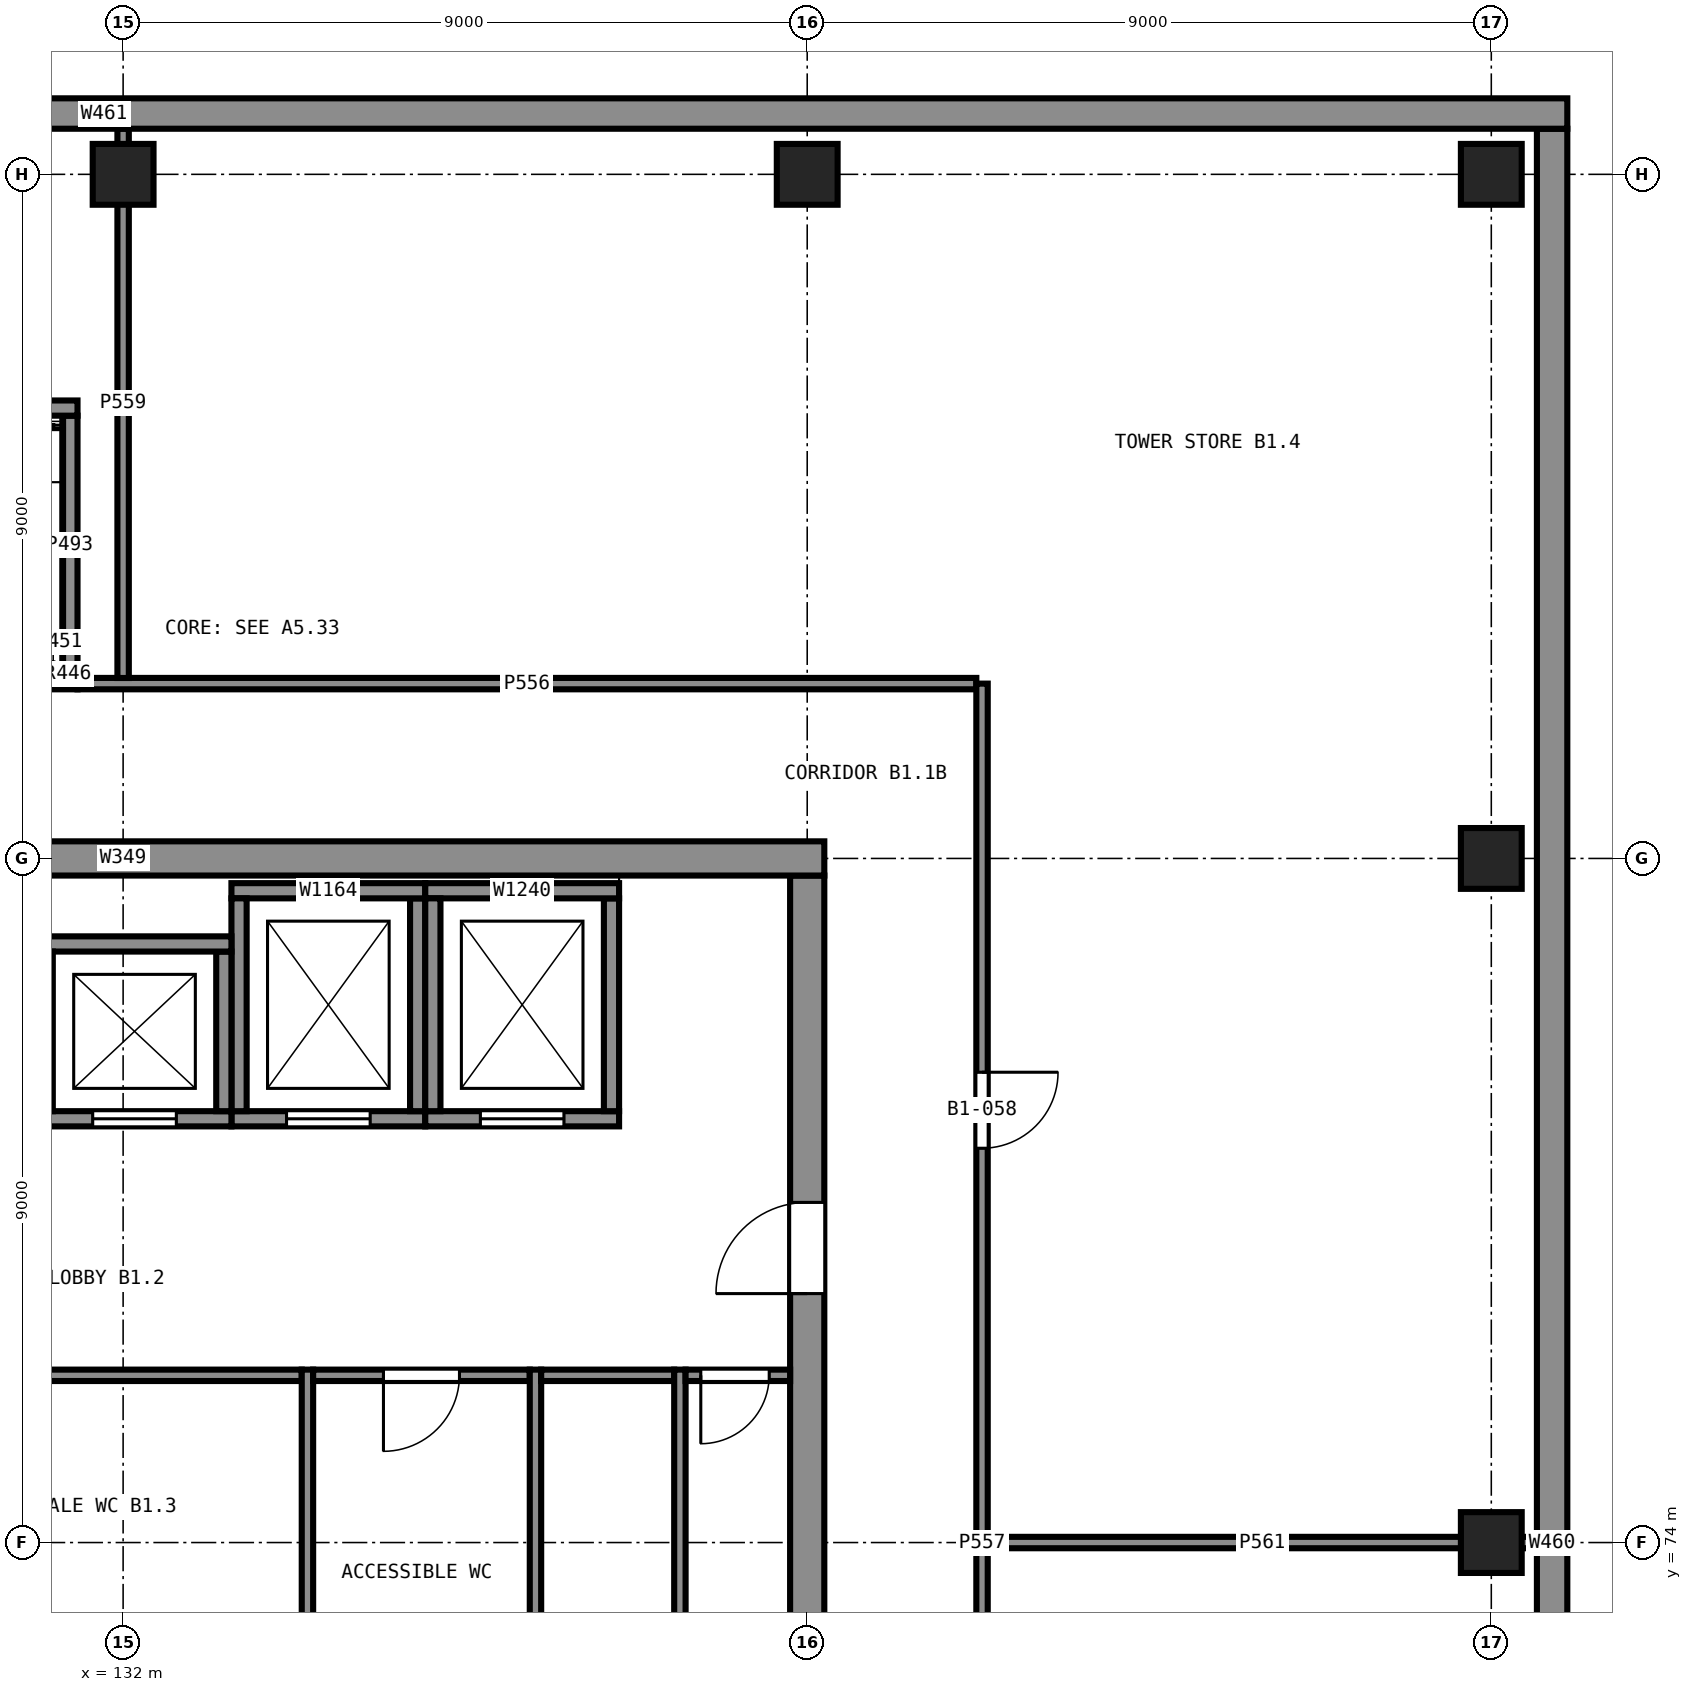
"""IFC4 building model, lengths in metres.
Left out: names, types, materials, properties, quantities, classifications, styles, units other than length and angle.
Written with IfcOpenShell. Run it as: python <this file> out.ifc"""

import sys

from ifc_helpers import new_model, si_unit, direction, frame, frame_2d, origin, origin_2d, place, context, subcontext, project, spatial, rectangle, extrude, element, fill, save


model = new_model("IFC4")
c1 = context("Model", 3, precision=1e-05, world=origin(), true_north=direction((0.0, 1.0)))
c2 = subcontext(c1, "Body", "Model", "MODEL_VIEW")
j1 = project(units=[si_unit("LENGTHUNIT", "METRE"), si_unit("PLANEANGLEUNIT", "RADIAN")], contexts=[c1])
p1 = place(None, origin())
s1 = spatial("IfcSite", under=j1, at=p1, CompositionType="ELEMENT")
p2 = place(p1, origin())
s2 = spatial("IfcBuilding", under=s1, at=p2, CompositionType="ELEMENT")
p3 = place(p2, frame((0.0, 0.0, -5.0)))
s3 = spatial("IfcBuildingStorey", under=s2, at=p3, CompositionType="ELEMENT", Elevation=-5.0)
for number, where, z_axis, x_axis in (
    (1, (132.0, 92.0, 0.0), (0.0, 0.0, 1.0), (1.0, 0.0, 0.0)),
    (2, (141.0, 92.0, 0.0), (0.0, 0.0, 1.0), (1.0, 0.0, 0.0)),
    (3, (150.0, 74.0, 0.0), (0.0, 0.0, 1.0), (1.0, 0.0, 0.0)),
    (4, (150.0, 83.0, 0.0), (0.0, 0.0, 1.0), (1.0, 0.0, 0.0)),
    (5, (150.0, 92.0, 0.0), (0.0, 0.0, 1.0), (1.0, 0.0, 0.0)),
):
    element("IfcColumn", number, at=place(p3, frame(where, z_axis=z_axis, x_axis=x_axis)), inside=s3, PredefinedType="COLUMN", context=c2, shape_type="SweptSolid", body=[
        extrude(rectangle(XDim=0.8, YDim=0.8, at=origin_2d()), origin(), (0.0, 0.0, 1.0), 5.0),
    ])
p4 = place(p3, frame((141.0, 65.225, 0.0), z_axis=(0.0, 0.0, 1.0), x_axis=(0.0, 1.0, 0.0)))
e6 = element("IfcWall", 6, at=p4, inside=s3, PredefinedType="SHEAR", context=c2, shape_type="SweptSolid", body=[
    extrude(rectangle(XDim=17.55, YDim=0.45, at=frame_2d((8.775, 0.0))), origin(), (0.0, 0.0, 1.0), 5.0),
])
p5 = place(p4, frame((4.3, 0.0, 0.0)))
e7 = element("IfcOpeningElement", 7, at=p5, cuts=e6, PredefinedType="OPENING", context=c2, shape_type="SweptSolid", body=[
    extrude(rectangle(XDim=1.2, YDim=2.1, at=frame_2d((0.6, 1.05))), frame((0.0, 0.235, 0.0), z_axis=(0.0, -1.0, 0.0), x_axis=(1.0, 0.0, 0.0)), (0.0, 0.0, 1.0), 0.47),
])
p6 = place(p4, frame((12.05, 0.0, 0.0)))
e8 = element("IfcOpeningElement", 8, at=p6, cuts=e6, PredefinedType="OPENING", context=c2, shape_type="SweptSolid", body=[
    extrude(rectangle(XDim=1.2, YDim=2.1, at=frame_2d((0.6, 1.05))), frame((0.0, 0.235, 0.0), z_axis=(0.0, -1.0, 0.0), x_axis=(1.0, 0.0, 0.0)), (0.0, 0.0, 1.0), 0.47),
])
p7 = place(p3, frame((141.225, 83.0, 0.0), z_axis=(0.0, 0.0, 1.0), x_axis=(-1.0, 0.0, 0.0)))
e9 = element("IfcWall", 9, at=p7, inside=s3, PredefinedType="SHEAR", context=c2, shape_type="SweptSolid", body=[
    extrude(rectangle(XDim=18.45, YDim=0.45, at=frame_2d((9.225, 0.0))), origin(), (0.0, 0.0, 1.0), 5.0),
])
p8 = place(p3, frame((150.8, 55.4, 0.0), z_axis=(0.0, 0.0, 1.0), x_axis=(0.0, 1.0, 0.0)))
e10 = element("IfcWall", 10, at=p8, inside=s3, PredefinedType="SOLIDWALL", context=c2, shape_type="SweptSolid", body=[
    extrude(rectangle(XDim=37.2, YDim=0.4, at=frame_2d((18.6, 0.0))), origin(), (0.0, 0.0, 1.0), 4.58),
])
p9 = place(p3, frame((151.0, 92.8, 0.0), z_axis=(0.0, 0.0, 1.0), x_axis=(-1.0, 0.0, 0.0)))
e11 = element("IfcWall", 11, at=p9, inside=s3, PredefinedType="SOLIDWALL", context=c2, shape_type="SweptSolid", body=[
    extrude(rectangle(XDim=38.5, YDim=0.4, at=frame_2d((19.25, 0.0))), origin(), (0.0, 0.0, 1.0), 4.58),
])
p10 = place(p3, frame((130.875, 79.575, 0.0), z_axis=(0.0, 0.0, 1.0), x_axis=(1.0, 0.0, 0.0)))
e12 = element("IfcWall", 12, at=p10, inside=s3, PredefinedType="SHEAR", context=c2, shape_type="SweptSolid", body=[
    extrude(rectangle(XDim=2.55, YDim=0.2, at=frame_2d((1.275, 0.0))), origin(), (0.0, 0.0, 1.0), 5.0),
])
p11 = place(p10, frame((0.725, 0.0, 0.0)))
e13 = element("IfcOpeningElement", 13, at=p11, cuts=e12, PredefinedType="OPENING", context=c2, shape_type="SweptSolid", body=[
    extrude(rectangle(XDim=1.1, YDim=2.1, at=frame_2d((0.55, 1.05))), frame((0.0, 0.11, 0.0), z_axis=(0.0, -1.0, 0.0), x_axis=(1.0, 0.0, 0.0)), (0.0, 0.0, 1.0), 0.22),
])
p12 = place(p3, frame((133.325, 79.675, 0.0), z_axis=(0.0, 0.0, 1.0), x_axis=(0.0, 1.0, 0.0)))
e14 = element("IfcWall", 14, at=p12, inside=s3, PredefinedType="SHEAR", context=c2, shape_type="SweptSolid", body=[
    extrude(rectangle(XDim=2.1, YDim=0.2, at=frame_2d((1.05, 0.0))), origin(), (0.0, 0.0, 1.0), 5.0),
])
p13 = place(p3, frame((133.425, 81.875, 0.0), z_axis=(0.0, 0.0, 1.0), x_axis=(-1.0, 0.0, 0.0)))
e15 = element("IfcWall", 15, at=p13, inside=s3, PredefinedType="SHEAR", context=c2, shape_type="SweptSolid", body=[
    extrude(rectangle(XDim=2.55, YDim=0.2, at=frame_2d((1.275, 0.0))), origin(), (0.0, 0.0, 1.0), 5.0),
])
p14 = place(p3, frame((130.975, 81.775, 0.0), z_axis=(0.0, 0.0, 1.0), x_axis=(0.0, -1.0, 0.0)))
e16 = element("IfcWall", 16, at=p14, inside=s3, PredefinedType="SHEAR", context=c2, shape_type="SweptSolid", body=[
    extrude(rectangle(XDim=2.1, YDim=0.2, at=frame_2d((1.05, 0.0))), origin(), (0.0, 0.0, 1.0), 5.0),
])
p15 = place(p3, frame((133.425, 79.575, 0.0), z_axis=(0.0, 0.0, 1.0), x_axis=(1.0, 0.0, 0.0)))
e17 = element("IfcWall", 17, at=p15, inside=s3, PredefinedType="SHEAR", context=c2, shape_type="SweptSolid", body=[
    extrude(rectangle(XDim=2.55, YDim=0.2, at=frame_2d((1.275, 0.0))), origin(), (0.0, 0.0, 1.0), 5.0),
])
p16 = place(p15, frame((0.725, 0.0, 0.0)))
e18 = element("IfcOpeningElement", 18, at=p16, cuts=e17, PredefinedType="OPENING", context=c2, shape_type="SweptSolid", body=[
    extrude(rectangle(XDim=1.1, YDim=2.1, at=frame_2d((0.55, 1.05))), frame((0.0, 0.11, 0.0), z_axis=(0.0, -1.0, 0.0), x_axis=(1.0, 0.0, 0.0)), (0.0, 0.0, 1.0), 0.22),
])
p17 = place(p3, frame((135.875, 79.675, 0.0), z_axis=(0.0, 0.0, 1.0), x_axis=(0.0, 1.0, 0.0)))
e19 = element("IfcWall", 19, at=p17, inside=s3, PredefinedType="SHEAR", context=c2, shape_type="SweptSolid", body=[
    extrude(rectangle(XDim=2.8, YDim=0.2, at=frame_2d((1.4, 0.0))), origin(), (0.0, 0.0, 1.0), 5.0),
])
p18 = place(p3, frame((135.975, 82.575, 0.0), z_axis=(0.0, 0.0, 1.0), x_axis=(-1.0, 0.0, 0.0)))
e20 = element("IfcWall", 20, at=p18, inside=s3, PredefinedType="SHEAR", context=c2, shape_type="SweptSolid", body=[
    extrude(rectangle(XDim=2.55, YDim=0.2, at=frame_2d((1.275, 0.0))), origin(), (0.0, 0.0, 1.0), 5.0),
])
p19 = place(p3, frame((133.525, 82.475, 0.0), z_axis=(0.0, 0.0, 1.0), x_axis=(0.0, -1.0, 0.0)))
e21 = element("IfcWall", 21, at=p19, inside=s3, PredefinedType="SHEAR", context=c2, shape_type="SweptSolid", body=[
    extrude(rectangle(XDim=2.8, YDim=0.2, at=frame_2d((1.4, 0.0))), origin(), (0.0, 0.0, 1.0), 5.0),
])
p20 = place(p3, frame((135.975, 79.575, 0.0), z_axis=(0.0, 0.0, 1.0), x_axis=(1.0, 0.0, 0.0)))
e22 = element("IfcWall", 22, at=p20, inside=s3, PredefinedType="SHEAR", context=c2, shape_type="SweptSolid", body=[
    extrude(rectangle(XDim=2.55, YDim=0.2, at=frame_2d((1.275, 0.0))), origin(), (0.0, 0.0, 1.0), 5.0),
])
p21 = place(p20, frame((0.725, 0.0, 0.0)))
e23 = element("IfcOpeningElement", 23, at=p21, cuts=e22, PredefinedType="OPENING", context=c2, shape_type="SweptSolid", body=[
    extrude(rectangle(XDim=1.1, YDim=2.1, at=frame_2d((0.55, 1.05))), frame((0.0, 0.11, 0.0), z_axis=(0.0, -1.0, 0.0), x_axis=(1.0, 0.0, 0.0)), (0.0, 0.0, 1.0), 0.22),
])
p22 = place(p3, frame((138.425, 79.675, 0.0), z_axis=(0.0, 0.0, 1.0), x_axis=(0.0, 1.0, 0.0)))
e24 = element("IfcWall", 24, at=p22, inside=s3, PredefinedType="SHEAR", context=c2, shape_type="SweptSolid", body=[
    extrude(rectangle(XDim=2.8, YDim=0.2, at=frame_2d((1.4, 0.0))), origin(), (0.0, 0.0, 1.0), 5.0),
])
p23 = place(p3, frame((138.525, 82.575, 0.0), z_axis=(0.0, 0.0, 1.0), x_axis=(-1.0, 0.0, 0.0)))
e25 = element("IfcWall", 25, at=p23, inside=s3, PredefinedType="SHEAR", context=c2, shape_type="SweptSolid", body=[
    extrude(rectangle(XDim=2.55, YDim=0.2, at=frame_2d((1.275, 0.0))), origin(), (0.0, 0.0, 1.0), 5.0),
])
p24 = place(p3, frame((136.075, 82.475, 0.0), z_axis=(0.0, 0.0, 1.0), x_axis=(0.0, -1.0, 0.0)))
e26 = element("IfcWall", 26, at=p24, inside=s3, PredefinedType="SHEAR", context=c2, shape_type="SweptSolid", body=[
    extrude(rectangle(XDim=2.8, YDim=0.2, at=frame_2d((1.4, 0.0))), origin(), (0.0, 0.0, 1.0), 5.0),
])
p25 = place(p3, frame((123.6, 85.325, 0.0), z_axis=(0.0, 0.0, 1.0), x_axis=(1.0, 0.0, 0.0)))
e27 = element("IfcWall", 27, at=p25, inside=s3, PredefinedType="SHEAR", context=c2, shape_type="SweptSolid", body=[
    extrude(rectangle(XDim=7.8, YDim=0.2, at=frame_2d((3.9, 0.0))), origin(), (0.0, 0.0, 1.0), 4.58),
])
p26 = place(p25, frame((0.6, 0.0, 0.0)))
e28 = element("IfcOpeningElement", 28, at=p26, cuts=e27, PredefinedType="OPENING", context=c2, shape_type="SweptSolid", body=[
    extrude(rectangle(XDim=1.0, YDim=2.1, at=frame_2d((0.5, 1.05))), frame((0.0, 0.11, 0.0), z_axis=(0.0, -1.0, 0.0), x_axis=(1.0, 0.0, 0.0)), (0.0, 0.0, 1.0), 0.22),
])
p27 = place(p3, frame((131.3, 85.425, 0.0), z_axis=(0.0, 0.0, 1.0), x_axis=(0.0, 1.0, 0.0)))
e29 = element("IfcWall", 29, at=p27, inside=s3, PredefinedType="SHEAR", context=c2, shape_type="SweptSolid", body=[
    extrude(rectangle(XDim=3.4, YDim=0.2, at=frame_2d((1.7, 0.0))), origin(), (0.0, 0.0, 1.0), 4.58),
])
p28 = place(p3, frame((131.4, 88.925, 0.0), z_axis=(0.0, 0.0, 1.0), x_axis=(-1.0, 0.0, 0.0)))
e30 = element("IfcWall", 30, at=p28, inside=s3, PredefinedType="SHEAR", context=c2, shape_type="SweptSolid", body=[
    extrude(rectangle(XDim=7.8, YDim=0.2, at=frame_2d((3.9, 0.0))), origin(), (0.0, 0.0, 1.0), 4.58),
])
p29 = place(p3, frame((134.425, 71.725, 0.0), z_axis=(0.0, 0.0, 1.0), x_axis=(0.0, 1.0, 0.0)))
e31 = element("IfcWall", 31, at=p29, inside=s3, PredefinedType="PARTITIONING", context=c2, shape_type="SweptSolid", body=[
    extrude(rectangle(XDim=4.55, YDim=0.15, at=frame_2d((2.275, 0.0))), origin(), (0.0, 0.0, 1.0), 4.58),
])
p30 = place(p3, frame((130.3, 76.2, 0.0), z_axis=(0.0, 0.0, 1.0), x_axis=(1.0, 0.0, 0.0)))
e32 = element("IfcWall", 32, at=p30, inside=s3, PredefinedType="PARTITIONING", context=c2, shape_type="SweptSolid", body=[
    extrude(rectangle(XDim=4.05, YDim=0.15, at=frame_2d((2.025, 0.0))), origin(), (0.0, 0.0, 1.0), 4.58),
])
p31 = place(p3, frame((137.425, 71.725, 0.0), z_axis=(0.0, 0.0, 1.0), x_axis=(0.0, 1.0, 0.0)))
e33 = element("IfcWall", 33, at=p31, inside=s3, PredefinedType="PARTITIONING", context=c2, shape_type="SweptSolid", body=[
    extrude(rectangle(XDim=4.55, YDim=0.15, at=frame_2d((2.275, 0.0))), origin(), (0.0, 0.0, 1.0), 4.58),
])
p32 = place(p3, frame((134.5, 76.2, 0.0), z_axis=(0.0, 0.0, 1.0), x_axis=(1.0, 0.0, 0.0)))
e34 = element("IfcWall", 34, at=p32, inside=s3, PredefinedType="PARTITIONING", context=c2, shape_type="SweptSolid", body=[
    extrude(rectangle(XDim=2.85, YDim=0.15, at=frame_2d((1.425, 0.0))), origin(), (0.0, 0.0, 1.0), 4.58),
])
p33 = place(p32, frame((0.925, 0.0, 0.0)))
e35 = element("IfcOpeningElement", 35, at=p33, cuts=e34, PredefinedType="OPENING", context=c2, shape_type="SweptSolid", body=[
    extrude(rectangle(XDim=1.0, YDim=2.1, at=frame_2d((0.5, 1.05))), frame((0.0, 0.085, 0.0), z_axis=(0.0, -1.0, 0.0), x_axis=(1.0, 0.0, 0.0)), (0.0, 0.0, 1.0), 0.17),
])
p34 = place(p3, frame((139.325, 71.725, 0.0), z_axis=(0.0, 0.0, 1.0), x_axis=(0.0, 1.0, 0.0)))
e36 = element("IfcWall", 36, at=p34, inside=s3, PredefinedType="PARTITIONING", context=c2, shape_type="SweptSolid", body=[
    extrude(rectangle(XDim=4.55, YDim=0.15, at=frame_2d((2.275, 0.0))), origin(), (0.0, 0.0, 1.0), 4.58),
])
p35 = place(p3, frame((137.5, 76.2, 0.0), z_axis=(0.0, 0.0, 1.0), x_axis=(1.0, 0.0, 0.0)))
e37 = element("IfcWall", 37, at=p35, inside=s3, PredefinedType="PARTITIONING", context=c2, shape_type="SweptSolid", body=[
    extrude(rectangle(XDim=1.75, YDim=0.15, at=frame_2d((0.875, 0.0))), origin(), (0.0, 0.0, 1.0), 4.58),
])
p36 = place(p3, frame((139.4, 76.2, 0.0), z_axis=(0.0, 0.0, 1.0), x_axis=(1.0, 0.0, 0.0)))
e38 = element("IfcWall", 38, at=p36, inside=s3, PredefinedType="PARTITIONING", context=c2, shape_type="SweptSolid", body=[
    extrude(rectangle(XDim=1.375, YDim=0.15, at=frame_2d((0.688, 0.0))), origin(), (0.0, 0.0, 1.0), 4.58),
])
p37 = place(p36, frame((0.2, 0.0, 0.0)))
e39 = element("IfcOpeningElement", 39, at=p37, cuts=e38, PredefinedType="OPENING", context=c2, shape_type="SweptSolid", body=[
    extrude(rectangle(XDim=0.9, YDim=2.1, at=frame_2d((0.45, 1.05))), frame((0.0, 0.085, 0.0), z_axis=(0.0, -1.0, 0.0), x_axis=(1.0, 0.0, 0.0)), (0.0, 0.0, 1.0), 0.17),
])
p38 = place(p3, frame((131.4, 85.3, 0.0), z_axis=(0.0, 0.0, 1.0), x_axis=(1.0, 0.0, 0.0)))
e40 = element("IfcWall", 40, at=p38, inside=s3, PredefinedType="PARTITIONING", context=c2, shape_type="SweptSolid", body=[
    extrude(rectangle(XDim=11.825, YDim=0.15, at=frame_2d((5.913, 0.0))), origin(), (0.0, 0.0, 1.0), 4.58),
])
p39 = place(p3, frame((143.3, 85.3, 0.0), z_axis=(0.0, 0.0, 1.0), x_axis=(0.0, -1.0, 0.0)))
e41 = element("IfcWall", 41, at=p39, inside=s3, PredefinedType="PARTITIONING", context=c2, shape_type="SweptSolid", body=[
    extrude(rectangle(XDim=22.6, YDim=0.15, at=frame_2d((11.3, 0.0))), origin(), (0.0, 0.0, 1.0), 4.58),
])
p40 = place(p39, frame((16.488, 0.0, 0.0)))
e42 = element("IfcOpeningElement", 42, at=p40, cuts=e41, PredefinedType="OPENING", context=c2, shape_type="SweptSolid", body=[
    extrude(rectangle(XDim=1.0, YDim=2.1, at=frame_2d((0.5, 1.05))), frame((0.0, 0.085, 0.0), z_axis=(0.0, -1.0, 0.0), x_axis=(1.0, 0.0, 0.0)), (0.0, 0.0, 1.0), 0.17),
])
p41 = place(p39, frame((5.113, 0.0, 0.0)))
e43 = element("IfcOpeningElement", 43, at=p41, cuts=e41, PredefinedType="OPENING", context=c2, shape_type="SweptSolid", body=[
    extrude(rectangle(XDim=1.0, YDim=2.1, at=frame_2d((0.5, 1.05))), frame((0.0, 0.085, 0.0), z_axis=(0.0, -1.0, 0.0), x_axis=(1.0, 0.0, 0.0)), (0.0, 0.0, 1.0), 0.17),
])
for number, where, z_axis, x_axis in (
    (44, (132.0, 85.374, 0.0), (0.0, 0.0, 1.0), (0.0, 1.0, 0.0)),
    (45, (143.374, 74.0, 0.0), (0.0, 0.0, 1.0), (1.0, 0.0, 0.0)),
):
    element("IfcWall", number, at=place(p3, frame(where, z_axis=z_axis, x_axis=x_axis)), inside=s3, PredefinedType="PARTITIONING", context=c2, shape_type="SweptSolid", body=[
        extrude(rectangle(XDim=7.227, YDim=0.15, at=frame_2d((3.614, 0.0))), origin(), (0.0, 0.0, 1.0), 3.68),
    ])
p42 = place(p11, origin())
e46 = element("IfcDoor", 46, at=p42, inside=s3, OperationType="SLIDING_TO_LEFT", PredefinedType="DOOR", context=c2, shape_type="SweptSolid", body=[
    extrude(rectangle(XDim=1.1, YDim=2.1, at=frame_2d((0.55, 1.05))), frame((0.0, 0.025, 0.0), z_axis=(0.0, -1.0, 0.0), x_axis=(1.0, 0.0, 0.0)), (0.0, 0.0, 1.0), 0.05),
])
fill(e13, e46)
p43 = place(p16, origin())
e47 = element("IfcDoor", 47, at=p43, inside=s3, OperationType="SLIDING_TO_LEFT", PredefinedType="DOOR", context=c2, shape_type="SweptSolid", body=[
    extrude(rectangle(XDim=1.1, YDim=2.1, at=frame_2d((0.55, 1.05))), frame((0.0, 0.025, 0.0), z_axis=(0.0, -1.0, 0.0), x_axis=(1.0, 0.0, 0.0)), (0.0, 0.0, 1.0), 0.05),
])
fill(e18, e47)
p44 = place(p21, origin())
e48 = element("IfcDoor", 48, at=p44, inside=s3, OperationType="SLIDING_TO_LEFT", PredefinedType="DOOR", context=c2, shape_type="SweptSolid", body=[
    extrude(rectangle(XDim=1.1, YDim=2.1, at=frame_2d((0.55, 1.05))), frame((0.0, 0.025, 0.0), z_axis=(0.0, -1.0, 0.0), x_axis=(1.0, 0.0, 0.0)), (0.0, 0.0, 1.0), 0.05),
])
fill(e23, e48)
p45 = place(p6, origin())
e49 = element("IfcDoor", 49, at=p45, inside=s3, OperationType="SINGLE_SWING_RIGHT", PredefinedType="DOOR", context=c2, shape_type="SweptSolid", body=[
    extrude(rectangle(XDim=1.2, YDim=2.1, at=frame_2d((0.6, 1.05))), frame((0.0, 0.025, 0.0), z_axis=(0.0, -1.0, 0.0), x_axis=(1.0, 0.0, 0.0)), (0.0, 0.0, 1.0), 0.05),
])
fill(e8, e49)
p46 = place(p33, frame((1.0, 0.0, 0.0), z_axis=(0.0, 0.0, 1.0), x_axis=(-1.0, 0.0, 0.0)))
e50 = element("IfcDoor", 50, at=p46, inside=s3, OperationType="SINGLE_SWING_LEFT", PredefinedType="DOOR", context=c2, shape_type="SweptSolid", body=[
    extrude(rectangle(XDim=1.0, YDim=2.1, at=frame_2d((0.5, 1.05))), frame((0.0, 0.025, 0.0), z_axis=(0.0, -1.0, 0.0), x_axis=(1.0, 0.0, 0.0)), (0.0, 0.0, 1.0), 0.05),
])
fill(e35, e50)
p47 = place(p37, frame((0.9, 0.0, 0.0), z_axis=(0.0, 0.0, 1.0), x_axis=(-1.0, 0.0, 0.0)))
e51 = element("IfcDoor", 51, at=p47, inside=s3, OperationType="SINGLE_SWING_LEFT", PredefinedType="DOOR", context=c2, shape_type="SweptSolid", body=[
    extrude(rectangle(XDim=0.9, YDim=2.1, at=frame_2d((0.45, 1.05))), frame((0.0, 0.025, 0.0), z_axis=(0.0, -1.0, 0.0), x_axis=(1.0, 0.0, 0.0)), (0.0, 0.0, 1.0), 0.05),
])
fill(e39, e51)
p48 = place(p41, origin())
e52 = element("IfcDoor", 52, at=p48, inside=s3, OperationType="SINGLE_SWING_RIGHT", PredefinedType="DOOR", context=c2, shape_type="SweptSolid", body=[
    extrude(rectangle(XDim=1.0, YDim=2.1, at=frame_2d((0.5, 1.05))), frame((0.0, 0.025, 0.0), z_axis=(0.0, -1.0, 0.0), x_axis=(1.0, 0.0, 0.0)), (0.0, 0.0, 1.0), 0.05),
])
fill(e43, e52)
save(model, sys.argv[1])
